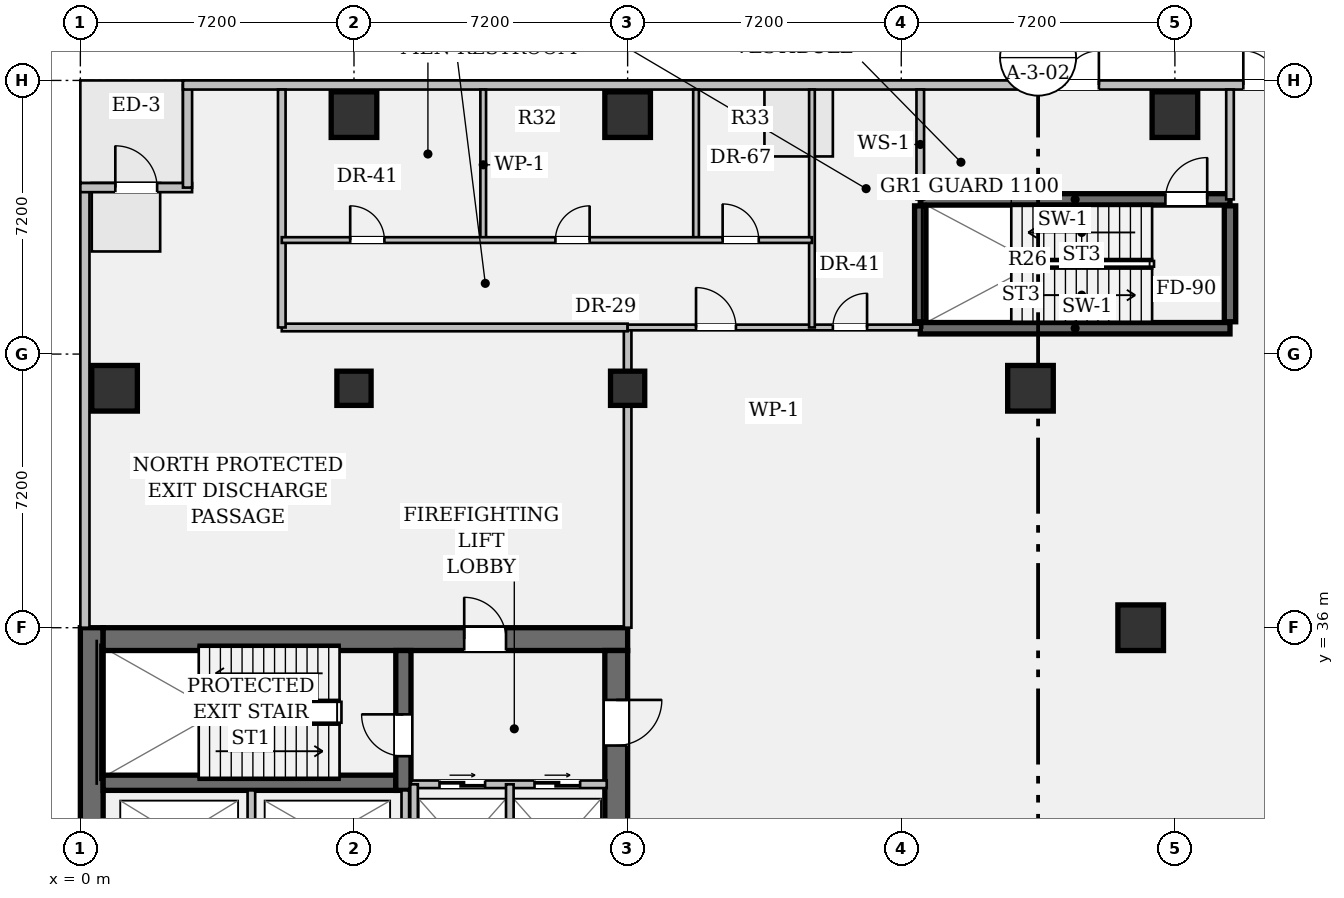
"""IFC4 building model, lengths in metres.
Left out: names, types, materials, properties, quantities, classifications, styles, units other than length and angle.
Written with IfcOpenShell. Run it as: python <this file> out.ifc"""

import sys

from ifc_helpers import new_model, si_unit, direction, frame, frame_2d, origin, origin_2d, place, context, subcontext, project, spatial, rectangle, hollow_rectangle, extrude, element, fill, save


model = new_model("IFC4")
c1 = context("Model", 3, precision=1e-05, world=origin(), true_north=direction((0.0, 1.0)))
c2 = subcontext(c1, "Body", "Model", "MODEL_VIEW")
j1 = project(units=[si_unit("LENGTHUNIT", "METRE"), si_unit("PLANEANGLEUNIT", "RADIAN")], contexts=[c1])
p1 = place(None, origin())
s1 = spatial("IfcSite", under=j1, at=p1, CompositionType="ELEMENT")
p2 = place(p1, origin())
s2 = spatial("IfcBuilding", under=s1, at=p2, CompositionType="ELEMENT")
p3 = place(p2, origin())
s3 = spatial("IfcBuildingStorey", under=s2, at=p3, CompositionType="ELEMENT", Elevation=0.0)
p4 = place(p3, frame((0.3, 7.2, 0.0), z_axis=(0.0, 0.0, 1.0), x_axis=(0.0, 1.0, 0.0)))
e1 = element("IfcWall", 1, at=p4, inside=s3, PredefinedType="SHEAR", context=c2, shape_type="SweptSolid", body=[
    extrude(rectangle(XDim=28.8, YDim=0.6, at=frame_2d((14.4, 0.0))), origin(), (0.0, 0.0, 1.0), 4.95),
])
p5 = place(p3, frame((0.6, 35.7, 0.0), z_axis=(0.0, 0.0, 1.0), x_axis=(1.0, 0.0, 0.0)))
e2 = element("IfcWall", 2, at=p5, inside=s3, PredefinedType="SHEAR", context=c2, shape_type="SweptSolid", body=[
    extrude(rectangle(XDim=13.8, YDim=0.6, at=frame_2d((6.9, 0.0))), origin(), (0.0, 0.0, 1.0), 4.95),
])
p6 = place(p5, frame((9.5, 0.0, 0.0)))
e3 = element("IfcOpeningElement", 3, at=p6, cuts=e2, PredefinedType="OPENING", context=c2, shape_type="SweptSolid", body=[
    extrude(rectangle(XDim=1.1, YDim=2.15, at=frame_2d((0.55, 1.075))), frame((0.0, 0.312, 0.0), z_axis=(0.0, -1.0, 0.0), x_axis=(1.0, 0.0, 0.0)), (0.0, 0.0, 1.0), 0.624),
])
p7 = place(p3, frame((14.1, 35.4, 0.0), z_axis=(0.0, 0.0, 1.0), x_axis=(0.0, -1.0, 0.0)))
e4 = element("IfcWall", 4, at=p7, inside=s3, PredefinedType="SHEAR", context=c2, shape_type="SweptSolid", body=[
    extrude(rectangle(XDim=27.6, YDim=0.6, at=frame_2d((13.8, 0.0))), origin(), (0.0, 0.0, 1.0), 4.95),
])
p8 = place(p7, frame((1.3, 0.0, 0.0)))
e5 = element("IfcOpeningElement", 5, at=p8, cuts=e4, PredefinedType="OPENING", context=c2, shape_type="SweptSolid", body=[
    extrude(rectangle(XDim=1.2, YDim=2.15, at=frame_2d((0.6, 1.075))), frame((0.0, 0.312, 0.0), z_axis=(0.0, -1.0, 0.0), x_axis=(1.0, 0.0, 0.0)), (0.0, 0.0, 1.0), 0.624),
])
p9 = place(p7, frame((25.25, 0.0, 0.0)))
e6 = element("IfcOpeningElement", 6, at=p9, cuts=e4, PredefinedType="OPENING", context=c2, shape_type="SweptSolid", body=[
    extrude(rectangle(XDim=1.2, YDim=2.15, at=frame_2d((0.6, 1.075))), frame((0.0, 0.312, 0.0), z_axis=(0.0, -1.0, 0.0), x_axis=(1.0, 0.0, 0.0)), (0.0, 0.0, 1.0), 0.624),
])
p10 = place(p7, frame((14.6, 0.0, 0.0)))
e7 = element("IfcOpeningElement", 7, at=p10, cuts=e4, PredefinedType="OPENING", context=c2, shape_type="SweptSolid", body=[
    extrude(rectangle(XDim=1.6, YDim=2.2, at=frame_2d((0.8, 1.1))), frame((0.0, 0.312, 0.0), z_axis=(0.0, -1.0, 0.0), x_axis=(1.0, 0.0, 0.0)), (0.0, 0.0, 1.0), 0.624),
])
p11 = place(p3, frame((0.6, 31.92, 0.0), z_axis=(0.0, 0.0, 1.0), x_axis=(1.0, 0.0, 0.0)))
e8 = element("IfcWall", 8, at=p11, inside=s3, PredefinedType="SHEAR", context=c2, shape_type="SweptSolid", body=[
    extrude(rectangle(XDim=7.7, YDim=0.4, at=frame_2d((3.85, 0.0))), origin(), (0.0, 0.0, 1.0), 4.95),
])
p12 = place(p3, frame((8.5, 31.72, 0.0), z_axis=(0.0, 0.0, 1.0), x_axis=(0.0, 1.0, 0.0)))
e9 = element("IfcWall", 9, at=p12, inside=s3, PredefinedType="SHEAR", context=c2, shape_type="SweptSolid", body=[
    extrude(rectangle(XDim=3.68, YDim=0.4, at=frame_2d((1.84, 0.0))), origin(), (0.0, 0.0, 1.0), 4.95),
])
p13 = place(p12, frame((0.9, 0.0, 0.0)))
e10 = element("IfcOpeningElement", 10, at=p13, cuts=e9, PredefinedType="OPENING", context=c2, shape_type="SweptSolid", body=[
    extrude(rectangle(XDim=1.1, YDim=2.15, at=frame_2d((0.55, 1.075))), frame((0.0, 0.212, 0.0), z_axis=(0.0, -1.0, 0.0), x_axis=(1.0, 0.0, 0.0)), (0.0, 0.0, 1.0), 0.424),
])
p14 = place(p3, frame((22.1, 43.88, 0.0), z_axis=(0.0, 0.0, 1.0), x_axis=(1.0, 0.0, 0.0)))
e11 = element("IfcWall", 11, at=p14, inside=s3, PredefinedType="SHEAR", context=c2, shape_type="SweptSolid", body=[
    extrude(rectangle(XDim=8.15, YDim=0.3, at=frame_2d((4.075, 0.0))), origin(), (0.0, 0.0, 1.0), 4.95),
])
p15 = place(p3, frame((22.1, 47.27, 0.0), z_axis=(0.0, 0.0, 1.0), x_axis=(1.0, 0.0, 0.0)))
e12 = element("IfcWall", 12, at=p15, inside=s3, PredefinedType="SHEAR", context=c2, shape_type="SweptSolid", body=[
    extrude(rectangle(XDim=8.15, YDim=0.3, at=frame_2d((4.075, 0.0))), origin(), (0.0, 0.0, 1.0), 4.95),
])
p16 = place(p15, frame((6.45, 0.0, 0.0)))
e13 = element("IfcOpeningElement", 13, at=p16, cuts=e12, PredefinedType="OPENING", context=c2, shape_type="SweptSolid", body=[
    extrude(rectangle(XDim=1.1, YDim=2.15, at=frame_2d((0.55, 1.075))), frame((0.0, 0.162, 0.0), z_axis=(0.0, -1.0, 0.0), x_axis=(1.0, 0.0, 0.0)), (0.0, 0.0, 1.0), 0.324),
])
for number, where, z_axis, x_axis in (
    (14, (22.1, 44.05, 0.0), (0.0, 0.0, 1.0), (0.0, 1.0, 0.0)),
    (15, (30.25, 44.05, 0.0), (0.0, 0.0, 1.0), (0.0, 1.0, 0.0)),
):
    element("IfcWall", number, at=place(p3, frame(where, z_axis=z_axis, x_axis=x_axis)), inside=s3, PredefinedType="SHEAR", context=c2, shape_type="SweptSolid", body=[
        extrude(rectangle(XDim=3.05, YDim=0.3, at=frame_2d((1.525, 0.0))), origin(), (0.0, 0.0, 1.0), 4.95),
    ])
p17 = place(p3, frame((0.9, 42.3, 0.0), z_axis=(0.0, 0.0, 1.0), x_axis=(1.0, 0.0, 0.0)))
e16 = element("IfcColumn", 16, at=p17, inside=s3, PredefinedType="COLUMN", context=c2, shape_type="SweptSolid", body=[
    extrude(hollow_rectangle(XDim=1.2, YDim=1.2, WallThickness=0.075, at=origin_2d()), origin(), (0.0, 0.0, 1.0), 4.95),
])
p18 = place(p3, frame((7.2, 42.3, 0.0), z_axis=(0.0, 0.0, 1.0), x_axis=(1.0, 0.0, 0.0)))
e17 = element("IfcColumn", 17, at=p18, inside=s3, PredefinedType="COLUMN", context=c2, shape_type="SweptSolid", body=[
    extrude(rectangle(XDim=0.9, YDim=0.9, at=origin_2d()), origin(), (0.0, 0.0, 1.0), 4.95),
])
p19 = place(p3, frame((7.2, 49.5, 0.0), z_axis=(0.0, 0.0, 1.0), x_axis=(1.0, 0.0, 0.0)))
e18 = element("IfcColumn", 18, at=p19, inside=s3, PredefinedType="COLUMN", context=c2, shape_type="SweptSolid", body=[
    extrude(hollow_rectangle(XDim=1.2, YDim=1.2, WallThickness=0.075, at=origin_2d()), origin(), (0.0, 0.0, 1.0), 4.95),
])
p20 = place(p3, frame((14.4, 42.3, 0.0), z_axis=(0.0, 0.0, 1.0), x_axis=(1.0, 0.0, 0.0)))
e19 = element("IfcColumn", 19, at=p20, inside=s3, PredefinedType="COLUMN", context=c2, shape_type="SweptSolid", body=[
    extrude(rectangle(XDim=0.9, YDim=0.9, at=origin_2d()), origin(), (0.0, 0.0, 1.0), 4.95),
])
for number, where, z_axis, x_axis in (
    (20, (14.4, 49.5, 0.0), (0.0, 0.0, 1.0), (1.0, 0.0, 0.0)),
    (21, (25.0, 42.3, 0.0), (0.0, 0.0, 1.0), (1.0, 0.0, 0.0)),
    (22, (27.9, 36.0, 0.0), (0.0, 0.0, 1.0), (1.0, 0.0, 0.0)),
    (23, (28.8, 49.5, 0.0), (0.0, 0.0, 1.0), (1.0, 0.0, 0.0)),
):
    element("IfcColumn", number, at=place(p3, frame(where, z_axis=z_axis, x_axis=x_axis)), inside=s3, PredefinedType="COLUMN", context=c2, shape_type="SweptSolid", body=[
        extrude(hollow_rectangle(XDim=1.2, YDim=1.2, WallThickness=0.075, at=origin_2d()), origin(), (0.0, 0.0, 1.0), 4.95),
    ])
p21 = place(p3, frame((0.12, 36.0, 0.0), z_axis=(0.0, 0.0, 1.0), x_axis=(0.0, 1.0, 0.0)))
e24 = element("IfcWall", 24, at=p21, inside=s3, PredefinedType="STANDARD", context=c2, shape_type="SweptSolid", body=[
    extrude(rectangle(XDim=11.58, YDim=0.24, at=frame_2d((5.79, 0.0))), origin(), (0.0, 0.0, 1.0), 4.95),
])
p22 = place(p3, frame((0.0, 47.58, 0.0), z_axis=(0.0, 0.0, 1.0), x_axis=(1.0, 0.0, 0.0)))
e25 = element("IfcWall", 25, at=p22, inside=s3, PredefinedType="STANDARD", context=c2, shape_type="SweptSolid", body=[
    extrude(rectangle(XDim=2.94, YDim=0.24, at=frame_2d((1.47, 0.0))), origin(), (0.0, 0.0, 1.0), 4.95),
])
p23 = place(p22, frame((0.92, 0.0, 0.0)))
e26 = element("IfcOpeningElement", 26, at=p23, cuts=e25, PredefinedType="OPENING", context=c2, shape_type="SweptSolid", body=[
    extrude(rectangle(XDim=1.1, YDim=2.15, at=frame_2d((0.55, 1.075))), frame((0.0, 0.132, 0.0), z_axis=(0.0, -1.0, 0.0), x_axis=(1.0, 0.0, 0.0)), (0.0, 0.0, 1.0), 0.264),
])
p24 = place(p3, frame((2.82, 47.58, 0.0), z_axis=(0.0, 0.0, 1.0), x_axis=(0.0, 1.0, 0.0)))
e27 = element("IfcWall", 27, at=p24, inside=s3, PredefinedType="STANDARD", context=c2, shape_type="SweptSolid", body=[
    extrude(rectangle(XDim=2.7, YDim=0.24, at=frame_2d((1.35, 0.0))), origin(), (0.0, 0.0, 1.0), 4.95),
])
p25 = place(p3, frame((2.7, 50.28, 0.0), z_axis=(0.0, 0.0, 1.0), x_axis=(1.0, 0.0, 0.0)))
e28 = element("IfcWall", 28, at=p25, inside=s3, PredefinedType="STANDARD", context=c2, shape_type="SweptSolid", body=[
    extrude(rectangle(XDim=45.0, YDim=0.24, at=frame_2d((22.5, 0.0))), origin(), (0.0, 0.0, 1.0), 4.95),
])
p26 = place(p25, frame((22.3, 0.0, 0.0)))
e29 = element("IfcOpeningElement", 29, at=p26, cuts=e28, PredefinedType="OPENING", context=c2, shape_type="SweptSolid", body=[
    extrude(rectangle(XDim=1.8, YDim=2.2, at=frame_2d((0.9, 1.1))), frame((0.0, 0.132, 0.0), z_axis=(0.0, -1.0, 0.0), x_axis=(1.0, 0.0, 0.0)), (0.0, 0.0, 1.0), 0.264),
])
p27 = place(p25, frame((27.9, 0.0, 0.0)))
e30 = element("IfcOpeningElement", 30, at=p27, cuts=e28, PredefinedType="OPENING", context=c2, shape_type="SweptSolid", body=[
    extrude(rectangle(XDim=1.8, YDim=2.2, at=frame_2d((0.9, 1.1))), frame((0.0, 0.132, 0.0), z_axis=(0.0, -1.0, 0.0), x_axis=(1.0, 0.0, 0.0)), (0.0, 0.0, 1.0), 0.264),
])
p28 = place(p3, frame((8.7, 31.88, 0.0), z_axis=(0.0, 0.0, 1.0), x_axis=(1.0, 0.0, 0.0)))
e31 = element("IfcWall", 31, at=p28, inside=s3, PredefinedType="PARTITIONING", context=c2, shape_type="SweptSolid", body=[
    extrude(rectangle(XDim=5.15, YDim=0.2, at=frame_2d((2.575, 0.0))), origin(), (0.0, 0.0, 1.0), 4.95),
])
p29 = place(p28, frame((0.75, 0.0, 0.0)))
e32 = element("IfcOpeningElement", 32, at=p29, cuts=e31, PredefinedType="OPENING", context=c2, shape_type="SweptSolid", body=[
    extrude(rectangle(XDim=1.2, YDim=2.2, at=frame_2d((0.6, 1.1))), frame((0.0, 0.112, 0.0), z_axis=(0.0, -1.0, 0.0), x_axis=(1.0, 0.0, 0.0)), (0.0, 0.0, 1.0), 0.224),
])
p30 = place(p28, frame((3.25, 0.0, 0.0)))
e33 = element("IfcOpeningElement", 33, at=p30, cuts=e31, PredefinedType="OPENING", context=c2, shape_type="SweptSolid", body=[
    extrude(rectangle(XDim=1.2, YDim=2.2, at=frame_2d((0.6, 1.1))), frame((0.0, 0.112, 0.0), z_axis=(0.0, -1.0, 0.0), x_axis=(1.0, 0.0, 0.0)), (0.0, 0.0, 1.0), 0.224),
])
for number, where, z_axis, x_axis in (
    (34, (8.78, 28.78, 0.0), (0.0, 0.0, 1.0), (0.0, 1.0, 0.0)),
    (35, (11.3, 28.78, 0.0), (0.0, 0.0, 1.0), (0.0, 1.0, 0.0)),
):
    element("IfcWall", number, at=place(p3, frame(where, z_axis=z_axis, x_axis=x_axis)), inside=s3, PredefinedType="PARTITIONING", context=c2, shape_type="SweptSolid", body=[
        extrude(rectangle(XDim=3.1, YDim=0.2, at=frame_2d((1.55, 0.0))), origin(), (0.0, 0.0, 1.0), 4.95),
    ])
for number, where, z_axis, x_axis in (
    (36, (4.5, 28.78, 0.0), (0.0, 0.0, 1.0), (0.0, 1.0, 0.0)),
    (37, (8.55, 28.78, 0.0), (0.0, 0.0, 1.0), (0.0, 1.0, 0.0)),
):
    element("IfcWall", number, at=place(p3, frame(where, z_axis=z_axis, x_axis=x_axis)), inside=s3, PredefinedType="PARTITIONING", context=c2, shape_type="SweptSolid", body=[
        extrude(rectangle(XDim=2.94, YDim=0.2, at=frame_2d((1.47, 0.0))), origin(), (0.0, 0.0, 1.0), 4.95),
    ])
for number, where, z_axis, x_axis in (
    (38, (22.1, 47.27, 0.0), (0.0, 0.0, 1.0), (0.0, 1.0, 0.0)),
    (39, (30.25, 47.27, 0.0), (0.0, 0.0, 1.0), (0.0, 1.0, 0.0)),
):
    element("IfcWall", number, at=place(p3, frame(where, z_axis=z_axis, x_axis=x_axis)), inside=s3, PredefinedType="PARTITIONING", context=c2, shape_type="SweptSolid", body=[
        extrude(rectangle(XDim=2.89, YDim=0.2, at=frame_2d((1.445, 0.0))), origin(), (0.0, 0.0, 1.0), 4.313),
    ])
p31 = place(p3, frame((14.4, 36.0, 0.0), z_axis=(0.0, 0.0, 1.0), x_axis=(0.0, 1.0, 0.0)))
e40 = element("IfcWall", 40, at=p31, inside=s3, PredefinedType="PARTITIONING", context=c2, shape_type="SweptSolid", body=[
    extrude(rectangle(XDim=7.9, YDim=0.2, at=frame_2d((3.95, 0.0))), origin(), (0.0, 0.0, 1.0), 3.988),
])
p32 = place(p3, frame((5.3, 43.9, 0.0), z_axis=(0.0, 0.0, 1.0), x_axis=(1.0, 0.0, 0.0)))
e41 = element("IfcWall", 41, at=p32, inside=s3, PredefinedType="PARTITIONING", context=c2, shape_type="SweptSolid", body=[
    extrude(rectangle(XDim=9.1, YDim=0.2, at=frame_2d((4.55, 0.0))), origin(), (0.0, 0.0, 1.0), 3.988),
])
p33 = place(p3, frame((5.3, 43.9, 0.0), z_axis=(0.0, 0.0, 1.0), x_axis=(0.0, 1.0, 0.0)))
e42 = element("IfcWall", 42, at=p33, inside=s3, PredefinedType="PARTITIONING", context=c2, shape_type="SweptSolid", body=[
    extrude(rectangle(XDim=6.26, YDim=0.2, at=frame_2d((3.13, 0.0))), origin(), (0.0, 0.0, 1.0), 4.95),
])
p34 = place(p3, frame((14.4, 43.9, 0.0), z_axis=(0.0, 0.0, 1.0), x_axis=(1.0, 0.0, 0.0)))
e43 = element("IfcWall", 43, at=p34, inside=s3, PredefinedType="PARTITIONING", context=c2, shape_type="SweptSolid", body=[
    extrude(rectangle(XDim=7.7, YDim=0.15, at=frame_2d((3.85, 0.0))), origin(), (0.0, 0.0, 1.0), 3.988),
])
p35 = place(p34, frame((1.8, 0.0, 0.0)))
e44 = element("IfcOpeningElement", 44, at=p35, cuts=e43, PredefinedType="OPENING", context=c2, shape_type="SweptSolid", body=[
    extrude(rectangle(XDim=1.05, YDim=2.15, at=frame_2d((0.525, 1.075))), frame((0.0, 0.087, 0.0), z_axis=(0.0, -1.0, 0.0), x_axis=(1.0, 0.0, 0.0)), (0.0, 0.0, 1.0), 0.174),
])
p36 = place(p34, frame((5.4, 0.0, 0.0)))
e45 = element("IfcOpeningElement", 45, at=p36, cuts=e43, PredefinedType="OPENING", context=c2, shape_type="SweptSolid", body=[
    extrude(rectangle(XDim=0.9, YDim=2.15, at=frame_2d((0.45, 1.075))), frame((0.0, 0.087, 0.0), z_axis=(0.0, -1.0, 0.0), x_axis=(1.0, 0.0, 0.0)), (0.0, 0.0, 1.0), 0.174),
])
for number, where, z_axis, x_axis in (
    (46, (10.6, 46.2, 0.0), (0.0, 0.0, 1.0), (0.0, 1.0, 0.0)),
    (47, (16.2, 46.2, 0.0), (0.0, 0.0, 1.0), (0.0, 1.0, 0.0)),
):
    element("IfcWall", number, at=place(p3, frame(where, z_axis=z_axis, x_axis=x_axis)), inside=s3, PredefinedType="PARTITIONING", context=c2, shape_type="SweptSolid", body=[
        extrude(rectangle(XDim=3.96, YDim=0.15, at=frame_2d((1.98, 0.0))), origin(), (0.0, 0.0, 1.0), 4.313),
    ])
p37 = place(p3, frame((19.25, 43.9, 0.0), z_axis=(0.0, 0.0, 1.0), x_axis=(0.0, 1.0, 0.0)))
e48 = element("IfcWall", 48, at=p37, inside=s3, PredefinedType="PARTITIONING", context=c2, shape_type="SweptSolid", body=[
    extrude(rectangle(XDim=6.26, YDim=0.15, at=frame_2d((3.13, 0.0))), origin(), (0.0, 0.0, 1.0), 4.313),
])
p38 = place(p3, frame((5.3, 46.2, 0.0), z_axis=(0.0, 0.0, 1.0), x_axis=(1.0, 0.0, 0.0)))
e49 = element("IfcWall", 49, at=p38, inside=s3, PredefinedType="PARTITIONING", context=c2, shape_type="SweptSolid", body=[
    extrude(rectangle(XDim=13.95, YDim=0.15, at=frame_2d((6.975, 0.0))), origin(), (0.0, 0.0, 1.0), 3.988),
])
p39 = place(p38, frame((1.8, 0.0, 0.0)))
e50 = element("IfcOpeningElement", 50, at=p39, cuts=e49, PredefinedType="OPENING", context=c2, shape_type="SweptSolid", body=[
    extrude(rectangle(XDim=0.9, YDim=2.15, at=frame_2d((0.45, 1.075))), frame((0.0, 0.087, 0.0), z_axis=(0.0, -1.0, 0.0), x_axis=(1.0, 0.0, 0.0)), (0.0, 0.0, 1.0), 0.174),
])
p40 = place(p38, frame((7.2, 0.0, 0.0)))
e51 = element("IfcOpeningElement", 51, at=p40, cuts=e49, PredefinedType="OPENING", context=c2, shape_type="SweptSolid", body=[
    extrude(rectangle(XDim=0.9, YDim=2.15, at=frame_2d((0.45, 1.075))), frame((0.0, 0.087, 0.0), z_axis=(0.0, -1.0, 0.0), x_axis=(1.0, 0.0, 0.0)), (0.0, 0.0, 1.0), 0.174),
])
p41 = place(p38, frame((11.6, 0.0, 0.0)))
e52 = element("IfcOpeningElement", 52, at=p41, cuts=e49, PredefinedType="OPENING", context=c2, shape_type="SweptSolid", body=[
    extrude(rectangle(XDim=0.95, YDim=2.15, at=frame_2d((0.475, 1.075))), frame((0.0, 0.087, 0.0), z_axis=(0.0, -1.0, 0.0), x_axis=(1.0, 0.0, 0.0)), (0.0, 0.0, 1.0), 0.174),
])
p42 = place(p23, origin())
e53 = element("IfcDoor", 53, at=p42, inside=s3, OperationType="SINGLE_SWING_LEFT", PredefinedType="DOOR", context=c2, shape_type="SweptSolid", body=[
    extrude(rectangle(XDim=1.1, YDim=2.15, at=frame_2d((0.55, 1.075))), frame((0.0, 0.025, 0.0), z_axis=(0.0, -1.0, 0.0), x_axis=(1.0, 0.0, 0.0)), (0.0, 0.0, 1.0), 0.05),
])
fill(e26, e53)
p43 = place(p26, origin())
e54 = element("IfcDoor", 54, at=p43, inside=s3, OperationType="DOUBLE_DOOR_SINGLE_SWING", PredefinedType="DOOR", context=c2, shape_type="SweptSolid", body=[
    extrude(rectangle(XDim=1.8, YDim=2.2, at=frame_2d((0.9, 1.1))), frame((0.0, 0.025, 0.0), z_axis=(0.0, -1.0, 0.0), x_axis=(1.0, 0.0, 0.0)), (0.0, 0.0, 1.0), 0.05),
])
fill(e29, e54)
p44 = place(p27, origin())
e55 = element("IfcDoor", 55, at=p44, inside=s3, OperationType="DOUBLE_DOOR_SINGLE_SWING", PredefinedType="DOOR", context=c2, shape_type="SweptSolid", body=[
    extrude(rectangle(XDim=1.8, YDim=2.2, at=frame_2d((0.9, 1.1))), frame((0.0, 0.025, 0.0), z_axis=(0.0, -1.0, 0.0), x_axis=(1.0, 0.0, 0.0)), (0.0, 0.0, 1.0), 0.05),
])
fill(e30, e55)
p45 = place(p13, origin())
e56 = element("IfcDoor", 56, at=p45, inside=s3, OperationType="SINGLE_SWING_RIGHT", PredefinedType="DOOR", context=c2, shape_type="SweptSolid", body=[
    extrude(rectangle(XDim=1.1, YDim=2.15, at=frame_2d((0.55, 1.075))), frame((0.0, 0.025, 0.0), z_axis=(0.0, -1.0, 0.0), x_axis=(1.0, 0.0, 0.0)), (0.0, 0.0, 1.0), 0.05),
])
fill(e10, e56)
p46 = place(p8, origin())
e57 = element("IfcDoor", 57, at=p46, inside=s3, OperationType="SINGLE_SWING_LEFT", PredefinedType="DOOR", context=c2, shape_type="SweptSolid", body=[
    extrude(rectangle(XDim=1.2, YDim=2.15, at=frame_2d((0.6, 1.075))), frame((0.0, 0.025, 0.0), z_axis=(0.0, -1.0, 0.0), x_axis=(1.0, 0.0, 0.0)), (0.0, 0.0, 1.0), 0.05),
])
fill(e5, e57)
p47 = place(p29, origin())
e58 = element("IfcDoor", 58, at=p47, inside=s3, OperationType="DOUBLE_DOOR_SLIDING", PredefinedType="DOOR", context=c2, shape_type="SweptSolid", body=[
    extrude(rectangle(XDim=1.2, YDim=2.2, at=frame_2d((0.6, 1.1))), frame((0.0, 0.025, 0.0), z_axis=(0.0, -1.0, 0.0), x_axis=(1.0, 0.0, 0.0)), (0.0, 0.0, 1.0), 0.05),
])
fill(e32, e58)
p48 = place(p30, origin())
e59 = element("IfcDoor", 59, at=p48, inside=s3, OperationType="DOUBLE_DOOR_SLIDING", PredefinedType="DOOR", context=c2, shape_type="SweptSolid", body=[
    extrude(rectangle(XDim=1.2, YDim=2.2, at=frame_2d((0.6, 1.1))), frame((0.0, 0.025, 0.0), z_axis=(0.0, -1.0, 0.0), x_axis=(1.0, 0.0, 0.0)), (0.0, 0.0, 1.0), 0.05),
])
fill(e33, e59)
p49 = place(p16, origin())
e60 = element("IfcDoor", 60, at=p49, inside=s3, OperationType="SINGLE_SWING_RIGHT", PredefinedType="DOOR", context=c2, shape_type="SweptSolid", body=[
    extrude(rectangle(XDim=1.1, YDim=2.15, at=frame_2d((0.55, 1.075))), frame((0.0, 0.025, 0.0), z_axis=(0.0, -1.0, 0.0), x_axis=(1.0, 0.0, 0.0)), (0.0, 0.0, 1.0), 0.05),
])
fill(e13, e60)
p50 = place(p6, origin())
e61 = element("IfcDoor", 61, at=p50, inside=s3, OperationType="SINGLE_SWING_LEFT", PredefinedType="DOOR", context=c2, shape_type="SweptSolid", body=[
    extrude(rectangle(XDim=1.1, YDim=2.15, at=frame_2d((0.55, 1.075))), frame((0.0, 0.025, 0.0), z_axis=(0.0, -1.0, 0.0), x_axis=(1.0, 0.0, 0.0)), (0.0, 0.0, 1.0), 0.05),
])
fill(e3, e61)
p51 = place(p35, origin())
e62 = element("IfcDoor", 62, at=p51, inside=s3, OperationType="SINGLE_SWING_LEFT", PredefinedType="DOOR", context=c2, shape_type="SweptSolid", body=[
    extrude(rectangle(XDim=1.05, YDim=2.15, at=frame_2d((0.525, 1.075))), frame((0.0, 0.025, 0.0), z_axis=(0.0, -1.0, 0.0), x_axis=(1.0, 0.0, 0.0)), (0.0, 0.0, 1.0), 0.05),
])
fill(e44, e62)
p52 = place(p36, origin())
e63 = element("IfcDoor", 63, at=p52, inside=s3, OperationType="SINGLE_SWING_RIGHT", PredefinedType="DOOR", context=c2, shape_type="SweptSolid", body=[
    extrude(rectangle(XDim=0.9, YDim=2.15, at=frame_2d((0.45, 1.075))), frame((0.0, 0.025, 0.0), z_axis=(0.0, -1.0, 0.0), x_axis=(1.0, 0.0, 0.0)), (0.0, 0.0, 1.0), 0.05),
])
fill(e45, e63)
p53 = place(p39, origin())
e64 = element("IfcDoor", 64, at=p53, inside=s3, OperationType="SINGLE_SWING_LEFT", PredefinedType="DOOR", context=c2, shape_type="SweptSolid", body=[
    extrude(rectangle(XDim=0.9, YDim=2.15, at=frame_2d((0.45, 1.075))), frame((0.0, 0.025, 0.0), z_axis=(0.0, -1.0, 0.0), x_axis=(1.0, 0.0, 0.0)), (0.0, 0.0, 1.0), 0.05),
])
fill(e50, e64)
p54 = place(p40, origin())
e65 = element("IfcDoor", 65, at=p54, inside=s3, OperationType="SINGLE_SWING_RIGHT", PredefinedType="DOOR", context=c2, shape_type="SweptSolid", body=[
    extrude(rectangle(XDim=0.9, YDim=2.15, at=frame_2d((0.45, 1.075))), frame((0.0, 0.025, 0.0), z_axis=(0.0, -1.0, 0.0), x_axis=(1.0, 0.0, 0.0)), (0.0, 0.0, 1.0), 0.05),
])
fill(e51, e65)
p55 = place(p41, origin())
e66 = element("IfcDoor", 66, at=p55, inside=s3, OperationType="SINGLE_SWING_LEFT", PredefinedType="DOOR", context=c2, shape_type="SweptSolid", body=[
    extrude(rectangle(XDim=0.95, YDim=2.15, at=frame_2d((0.475, 1.075))), frame((0.0, 0.025, 0.0), z_axis=(0.0, -1.0, 0.0), x_axis=(1.0, 0.0, 0.0)), (0.0, 0.0, 1.0), 0.05),
])
fill(e52, e66)
save(model, sys.argv[1])
